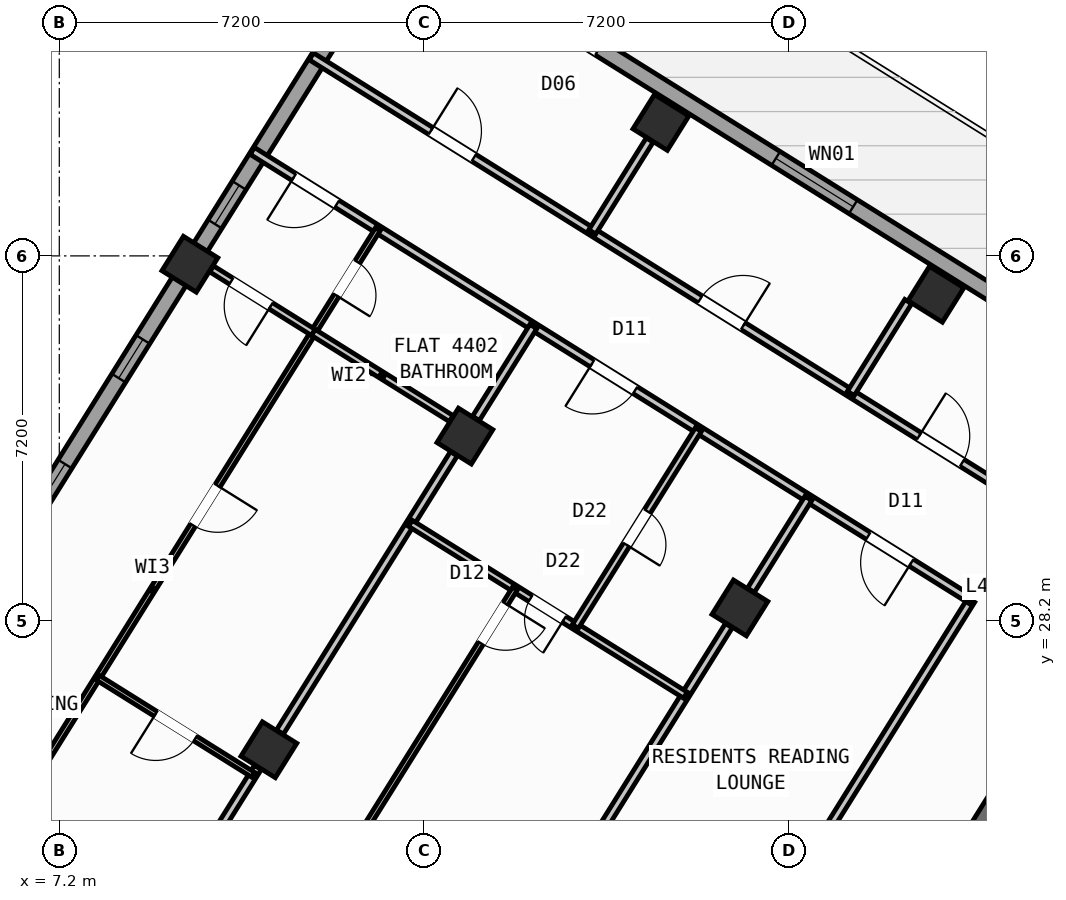
"""IFC4 building model, lengths in metres.
Left out: names, types, materials, properties, quantities, classifications, styles, units other than length and angle.
Written with IfcOpenShell. Run it as: python <this file> out.ifc"""

import sys

from ifc_helpers import new_model, si_unit, direction, frame, frame_2d, origin, origin_2d, place, context, subcontext, project, spatial, rectangle, hollow_rectangle, extrude, source, transform, mapped, element, fill, save


model = new_model("IFC4")
c1 = context("Model", 3, precision=1e-05, world=origin(), true_north=direction((0.0, 1.0)))
c2 = subcontext(c1, "Body", "Model", "MODEL_VIEW")
j1 = project(units=[si_unit("LENGTHUNIT", "METRE"), si_unit("PLANEANGLEUNIT", "RADIAN")], contexts=[c1])
p1 = place(None, origin())
s1 = spatial("IfcSite", under=j1, at=p1, CompositionType="ELEMENT")
p2 = place(p1, origin())
s2 = spatial("IfcBuilding", under=s1, at=p2, CompositionType="ELEMENT")
p3 = place(p2, frame((0.0, 0.0, 174.9)))
s3 = spatial("IfcBuildingStorey", under=s2, at=p3, CompositionType="ELEMENT", Elevation=174.9)
p4 = place(p3, frame((26.007, 24.976, 0.0), z_axis=(0.0, 0.0, 1.0), x_axis=(-0.529923795287, -0.848045264823, 0.0)))
e1 = element("IfcWall", 1, at=p4, inside=s3, PredefinedType="SHEAR", context=c2, shape_type="SweptSolid", body=[
    extrude(rectangle(XDim=6.425, YDim=0.55, at=frame_2d((3.212, 0.0))), origin(), (0.0, 0.0, 1.0), 4.22),
])
m1 = source(origin(), c2, "Body", "SweptSolid", [
    extrude(hollow_rectangle(XDim=0.8, YDim=0.8, WallThickness=0.032, at=origin_2d()), origin(), (0.0, 0.0, 1.0), 4.5),
])
for number, where, z_axis, x_axis in (
    (2, (24.5, 34.643, 0.0), (0.0, 0.0, 1.0), (-0.848, 0.53, 0.0)),
    (3, (20.632, 28.452, 0.0), (0.0, 0.0, 1.0), (-0.848, 0.53, 0.0)),
    (4, (19.073, 38.034, 0.0), (0.0, 0.0, 1.0), (-0.848, 0.53, 0.0)),
    (5, (15.205, 31.844, 0.0), (0.0, 0.0, 1.0), (-0.848, 0.53, 0.0)),
    (6, (11.336, 25.653, 0.0), (0.0, 0.0, 1.0), (-0.848, 0.53, 0.0)),
    (7, (9.777, 35.235, 0.0), (0.0, 0.0, 1.0), (-0.848, 0.53, 0.0)),
):
    element("IfcColumn", number, at=place(p3, frame(where, z_axis=z_axis, x_axis=x_axis)), inside=s3, PredefinedType="COLUMN", context=c2, shape_type="MappedRepresentation", body=[
        mapped(m1, transform((0.0, 0.0, 0.0), scale=1.0)),
    ])
p5 = place(p3, frame((2.415, 23.452, 0.0), z_axis=(0.0, 0.0, 1.0), x_axis=(0.52991049553, 0.848053575387, 0.0)))
e8 = element("IfcWall", 8, at=p5, inside=s3, PredefinedType="STANDARD", context=c2, shape_type="SweptSolid", body=[
    extrude(rectangle(XDim=21.587, YDim=0.32, at=frame_2d((10.794, 0.0))), origin(), (0.0, 0.0, 1.0), 2.395),
])
p6 = place(p5, frame((3.469, 0.0, 1.0)))
e9 = element("IfcOpeningElement", 9, at=p6, cuts=e8, PredefinedType="OPENING", context=c2, shape_type="SweptSolid", body=[
    extrude(rectangle(XDim=0.9, YDim=1.25, at=frame_2d((0.45, 0.625))), frame((0.0, 0.17, 0.0), z_axis=(0.0, -1.0, 0.0), x_axis=(1.0, 0.0, 0.0)), (0.0, 0.0, 1.0), 0.34),
])
p7 = place(p5, frame((8.344, 0.0, 1.0)))
e10 = element("IfcOpeningElement", 10, at=p7, cuts=e8, PredefinedType="OPENING", context=c2, shape_type="SweptSolid", body=[
    extrude(rectangle(XDim=0.9, YDim=1.25, at=frame_2d((0.45, 0.625))), frame((0.0, 0.17, 0.0), z_axis=(0.0, -1.0, 0.0), x_axis=(1.0, 0.0, 0.0)), (0.0, 0.0, 1.0), 0.34),
])
p8 = place(p5, frame((11.244, 0.0, 1.0)))
e11 = element("IfcOpeningElement", 11, at=p8, cuts=e8, PredefinedType="OPENING", context=c2, shape_type="SweptSolid", body=[
    extrude(rectangle(XDim=0.9, YDim=1.25, at=frame_2d((0.45, 0.625))), frame((0.0, 0.17, 0.0), z_axis=(0.0, -1.0, 0.0), x_axis=(1.0, 0.0, 0.0)), (0.0, 0.0, 1.0), 0.34),
])
p9 = place(p5, frame((14.829, 0.0, 1.0)))
e12 = element("IfcOpeningElement", 12, at=p9, cuts=e8, PredefinedType="OPENING", context=c2, shape_type="SweptSolid", body=[
    extrude(rectangle(XDim=0.9, YDim=1.25, at=frame_2d((0.45, 0.625))), frame((0.0, 0.17, 0.0), z_axis=(0.0, -1.0, 0.0), x_axis=(1.0, 0.0, 0.0)), (0.0, 0.0, 1.0), 0.34),
])
p10 = place(p3, frame((14.138, 41.825, 0.0), z_axis=(0.0, 0.0, 1.0), x_axis=(0.848046498049, -0.529921821731, 0.0)))
e13 = element("IfcWall", 13, at=p10, inside=s3, PredefinedType="STANDARD", context=c2, shape_type="SweptSolid", body=[
    extrude(rectangle(XDim=31.588, YDim=0.32, at=frame_2d((15.794, 0.0))), origin(), (0.0, 0.0, 1.0), 4.22),
])
p11 = place(p10, frame((3.339, 0.0, 0.0)))
e14 = element("IfcOpeningElement", 14, at=p11, cuts=e13, PredefinedType="OPENING", context=c2, shape_type="SweptSolid", body=[
    extrude(rectangle(XDim=1.05, YDim=2.15, at=frame_2d((0.525, 1.075))), frame((0.0, 0.17, 0.0), z_axis=(0.0, -1.0, 0.0), x_axis=(1.0, 0.0, 0.0)), (0.0, 0.0, 1.0), 0.34),
])
p12 = place(p10, frame((1.819, 0.0, 1.0)))
e15 = element("IfcOpeningElement", 15, at=p12, cuts=e13, PredefinedType="OPENING", context=c2, shape_type="SweptSolid", body=[
    extrude(rectangle(XDim=0.9, YDim=1.25, at=frame_2d((0.45, 0.625))), frame((0.0, 0.17, 0.0), z_axis=(0.0, -1.0, 0.0), x_axis=(1.0, 0.0, 0.0)), (0.0, 0.0, 1.0), 0.34),
])
p13 = place(p10, frame((8.494, 0.0, 0.85)))
e16 = element("IfcOpeningElement", 16, at=p13, cuts=e13, PredefinedType="OPENING", context=c2, shape_type="SweptSolid", body=[
    extrude(rectangle(XDim=1.8, YDim=1.5, at=frame_2d((0.9, 0.75))), frame((0.0, 0.17, 0.0), z_axis=(0.0, -1.0, 0.0), x_axis=(1.0, 0.0, 0.0)), (0.0, 0.0, 1.0), 0.34),
])
p14 = place(p10, frame((14.636, 0.0, 1.0)))
e17 = element("IfcOpeningElement", 17, at=p14, cuts=e13, PredefinedType="OPENING", context=c2, shape_type="SweptSolid", body=[
    extrude(rectangle(XDim=0.9, YDim=1.25, at=frame_2d((0.45, 0.625))), frame((0.0, 0.17, 0.0), z_axis=(0.0, -1.0, 0.0), x_axis=(1.0, 0.0, 0.0)), (0.0, 0.0, 1.0), 0.34),
])
p15 = place(p10, frame((22.456, 0.0, 0.95)))
e18 = element("IfcOpeningElement", 18, at=p15, cuts=e13, PredefinedType="OPENING", context=c2, shape_type="SweptSolid", body=[
    extrude(rectangle(XDim=1.2, YDim=1.4, at=frame_2d((0.6, 0.7))), frame((0.0, 0.17, 0.0), z_axis=(0.0, -1.0, 0.0), x_axis=(1.0, 0.0, 0.0)), (0.0, 0.0, 1.0), 0.34),
])
p16 = place(p10, frame((27.131, 0.0, 0.95)))
e19 = element("IfcOpeningElement", 19, at=p16, cuts=e13, PredefinedType="OPENING", context=c2, shape_type="SweptSolid", body=[
    extrude(rectangle(XDim=1.2, YDim=1.4, at=frame_2d((0.6, 0.7))), frame((0.0, 0.17, 0.0), z_axis=(0.0, -1.0, 0.0), x_axis=(1.0, 0.0, 0.0)), (0.0, 0.0, 1.0), 0.34),
])
p17 = place(p3, frame((25.198, 28.606, 0.0), z_axis=(0.0, 0.0, 1.0), x_axis=(-0.529921796515, -0.848046513806, 0.0)))
e20 = element("IfcWall", 20, at=p17, inside=s3, PredefinedType="PARTITIONING", context=c2, shape_type="SweptSolid", body=[
    extrude(rectangle(XDim=16.5, YDim=0.16, at=frame_2d((8.25, 0.0))), origin(), (0.0, 0.0, 1.0), 4.21),
])
p18 = place(p3, frame((26.363, 30.472, 0.0), z_axis=(0.0, 0.0, 1.0), x_axis=(-0.848052408131, 0.529912363569, 0.0)))
e21 = element("IfcWall", 21, at=p18, inside=s3, PredefinedType="PARTITIONING", context=c2, shape_type="SweptSolid", body=[
    extrude(rectangle(XDim=16.73, YDim=0.16, at=frame_2d((8.365, 0.0))), origin(), (0.0, 0.0, 1.0), 4.21),
])
p19 = place(p18, frame((1.588, 0.0, 0.0)))
e22 = element("IfcOpeningElement", 22, at=p19, cuts=e21, PredefinedType="OPENING", context=c2, shape_type="SweptSolid", body=[
    extrude(rectangle(XDim=1.0, YDim=2.1, at=frame_2d((0.5, 1.05))), frame((0.0, 0.09, 0.0), z_axis=(0.0, -1.0, 0.0), x_axis=(1.0, 0.0, 0.0)), (0.0, 0.0, 1.0), 0.18),
])
p20 = place(p18, frame((6.685, 0.0, 0.0)))
e23 = element("IfcOpeningElement", 23, at=p20, cuts=e21, PredefinedType="OPENING", context=c2, shape_type="SweptSolid", body=[
    extrude(rectangle(XDim=1.0, YDim=2.1, at=frame_2d((0.5, 1.05))), frame((0.0, 0.09, 0.0), z_axis=(0.0, -1.0, 0.0), x_axis=(1.0, 0.0, 0.0)), (0.0, 0.0, 1.0), 0.18),
])
p21 = place(p18, frame((12.951, 0.0, 0.0)))
e24 = element("IfcOpeningElement", 24, at=p21, cuts=e21, PredefinedType="OPENING", context=c2, shape_type="SweptSolid", body=[
    extrude(rectangle(XDim=1.0, YDim=2.1, at=frame_2d((0.5, 1.05))), frame((0.0, 0.09, 0.0), z_axis=(0.0, -1.0, 0.0), x_axis=(1.0, 0.0, 0.0)), (0.0, 0.0, 1.0), 0.18),
])
p22 = place(p3, frame((25.198, 28.606, 0.0), z_axis=(0.0, 0.0, 1.0), x_axis=(-0.848052408131, 0.529912363569, 0.0)))
e25 = element("IfcWall", 25, at=p22, inside=s3, PredefinedType="PARTITIONING", context=c2, shape_type="SweptSolid", body=[
    extrude(rectangle(XDim=16.73, YDim=0.16, at=frame_2d((8.365, 0.0))), origin(), (0.0, 0.0, 1.0), 4.21),
])
p23 = place(p22, frame((1.395, 0.0, 0.0)))
e26 = element("IfcOpeningElement", 26, at=p23, cuts=e25, PredefinedType="OPENING", context=c2, shape_type="SweptSolid", body=[
    extrude(rectangle(XDim=1.0, YDim=2.1, at=frame_2d((0.5, 1.05))), frame((0.0, 0.09, 0.0), z_axis=(0.0, -1.0, 0.0), x_axis=(1.0, 0.0, 0.0)), (0.0, 0.0, 1.0), 0.18),
])
p24 = place(p22, frame((7.82, 0.0, 0.0)))
e27 = element("IfcOpeningElement", 27, at=p24, cuts=e25, PredefinedType="OPENING", context=c2, shape_type="SweptSolid", body=[
    extrude(rectangle(XDim=1.0, YDim=2.1, at=frame_2d((0.5, 1.05))), frame((0.0, 0.09, 0.0), z_axis=(0.0, -1.0, 0.0), x_axis=(1.0, 0.0, 0.0)), (0.0, 0.0, 1.0), 0.18),
])
p25 = place(p22, frame((14.76, 0.0, 0.0)))
e28 = element("IfcOpeningElement", 28, at=p25, cuts=e25, PredefinedType="OPENING", context=c2, shape_type="SweptSolid", body=[
    extrude(rectangle(XDim=1.0, YDim=2.1, at=frame_2d((0.5, 1.05))), frame((0.0, 0.09, 0.0), z_axis=(0.0, -1.0, 0.0), x_axis=(1.0, 0.0, 0.0)), (0.0, 0.0, 1.0), 0.18),
])
p26 = place(p3, frame((21.983, 30.615, 0.0), z_axis=(0.0, 0.0, 1.0), x_axis=(-0.529978410432, -0.848011134641, 0.0)))
e29 = element("IfcWall", 29, at=p26, inside=s3, PredefinedType="PARTITIONING", context=c2, shape_type="SweptSolid", body=[
    extrude(rectangle(XDim=2.138, YDim=0.16, at=frame_2d((1.069, 0.0))), origin(), (0.0, 0.0, 1.0), 2.395),
])
p27 = place(p3, frame((20.414, 28.103, 0.0), z_axis=(0.0, 0.0, 1.0), x_axis=(-0.529934553702, -0.848038542045, 0.0)))
e30 = element("IfcWall", 30, at=p27, inside=s3, PredefinedType="PARTITIONING", context=c2, shape_type="SweptSolid", body=[
    extrude(rectangle(XDim=6.476, YDim=0.16, at=frame_2d((3.238, 0.0))), origin(), (0.0, 0.0, 1.0), 2.395),
])
p28 = place(p3, frame((16.556, 34.006, 0.0), z_axis=(0.0, 0.0, 1.0), x_axis=(-0.529927092104, -0.84804320471, 0.0)))
e31 = element("IfcWall", 31, at=p28, inside=s3, PredefinedType="PARTITIONING", context=c2, shape_type="SweptSolid", body=[
    extrude(rectangle(XDim=2.138, YDim=0.16, at=frame_2d((1.069, 0.0))), origin(), (0.0, 0.0, 1.0), 2.395),
])
p29 = place(p3, frame((14.986, 31.494, 0.0), z_axis=(0.0, 0.0, 1.0), x_axis=(-0.529907440938, -0.848055484057, 0.0)))
e32 = element("IfcWall", 32, at=p29, inside=s3, PredefinedType="PARTITIONING", context=c2, shape_type="SweptSolid", body=[
    extrude(rectangle(XDim=6.476, YDim=0.16, at=frame_2d((3.238, 0.0))), origin(), (0.0, 0.0, 1.0), 2.395),
])
p30 = place(p3, frame((11.118, 25.303, 0.0), z_axis=(0.0, 0.0, 1.0), x_axis=(-0.529919150083, -0.848048167486, 0.0)))
e33 = element("IfcWall", 33, at=p30, inside=s3, PredefinedType="PARTITIONING", context=c2, shape_type="SweptSolid", body=[
    extrude(rectangle(XDim=5.501, YDim=0.16, at=frame_2d((2.75, 0.0))), origin(), (0.0, 0.0, 1.0), 4.21),
])
p31 = place(p3, frame((19.556, 26.73, 0.0), z_axis=(0.0, 0.0, 1.0), x_axis=(-0.848049732085, 0.529916646191, 0.0)))
e34 = element("IfcWall", 34, at=p31, inside=s3, PredefinedType="PLUMBINGWALL", context=c2, shape_type="SweptSolid", body=[
    extrude(rectangle(XDim=6.4, YDim=0.14, at=frame_2d((3.2, 0.0))), origin(), (0.0, 0.0, 1.0), 4.21),
])
p32 = place(p31, frame((2.824, 0.0, 0.0)))
e35 = element("IfcOpeningElement", 35, at=p32, cuts=e34, PredefinedType="OPENING", context=c2, shape_type="SweptSolid", body=[
    extrude(rectangle(XDim=0.78, YDim=2.05, at=frame_2d((0.39, 1.025))), frame((0.0, 0.08, 0.0), z_axis=(0.0, -1.0, 0.0), x_axis=(1.0, 0.0, 0.0)), (0.0, 0.0, 1.0), 0.16),
])
p33 = place(p3, frame((19.812, 31.971, 0.0), z_axis=(0.0, 0.0, 1.0), x_axis=(-0.529917480809, -0.848049210561, 0.0)))
e36 = element("IfcWall", 36, at=p33, inside=s3, PredefinedType="PLUMBINGWALL", context=c2, shape_type="SweptSolid", body=[
    extrude(rectangle(XDim=4.58, YDim=0.14, at=frame_2d((2.29, 0.0))), origin(), (0.0, 0.0, 1.0), 4.21),
])
p34 = place(p33, frame((1.9, 0.0, 0.0)))
e37 = element("IfcOpeningElement", 37, at=p34, cuts=e36, PredefinedType="OPENING", context=c2, shape_type="SweptSolid", body=[
    extrude(rectangle(XDim=0.78, YDim=2.05, at=frame_2d((0.39, 1.025))), frame((0.0, 0.08, 0.0), z_axis=(0.0, -1.0, 0.0), x_axis=(1.0, 0.0, 0.0)), (0.0, 0.0, 1.0), 0.16),
])
p35 = place(p3, frame((16.191, 28.833, 0.0), z_axis=(0.0, 0.0, 1.0), x_axis=(-0.529921526101, -0.84804668278, 0.0)))
e38 = element("IfcWall", 38, at=p35, inside=s3, PredefinedType="PARTITIONING", context=c2, shape_type="SweptSolid", body=[
    extrude(rectangle(XDim=12.19, YDim=0.11, at=frame_2d((6.095, 0.0))), origin(), (0.0, 0.0, 1.0), 4.21),
])
p36 = place(p35, frame((0.35, 0.0, 0.0)))
e39 = element("IfcOpeningElement", 39, at=p36, cuts=e38, PredefinedType="OPENING", context=c2, shape_type="SweptSolid", body=[
    extrude(rectangle(XDim=0.92, YDim=2.08, at=frame_2d((0.46, 1.04))), frame((0.0, 0.065, 0.0), z_axis=(0.0, -1.0, 0.0), x_axis=(1.0, 0.0, 0.0)), (0.0, 0.0, 1.0), 0.13),
])
p37 = place(p3, frame((13.486, 35.924, 0.0), z_axis=(0.0, 0.0, 1.0), x_axis=(-0.529920421309, -0.848047373134, 0.0)))
e40 = element("IfcWall", 40, at=p37, inside=s3, PredefinedType="PARTITIONING", context=c2, shape_type="SweptSolid", body=[
    extrude(rectangle(XDim=16.77, YDim=0.11, at=frame_2d((8.385, 0.0))), origin(), (0.0, 0.0, 1.0), 4.21),
])
p38 = place(p37, frame((0.76, 0.0, 0.0)))
e41 = element("IfcOpeningElement", 41, at=p38, cuts=e40, PredefinedType="OPENING", context=c2, shape_type="SweptSolid", body=[
    extrude(rectangle(XDim=0.78, YDim=2.05, at=frame_2d((0.39, 1.025))), frame((0.0, 0.065, 0.0), z_axis=(0.0, -1.0, 0.0), x_axis=(1.0, 0.0, 0.0)), (0.0, 0.0, 1.0), 0.13),
])
p39 = place(p37, frame((5.967, 0.0, 0.0)))
e42 = element("IfcOpeningElement", 42, at=p39, cuts=e40, PredefinedType="OPENING", context=c2, shape_type="SweptSolid", body=[
    extrude(rectangle(XDim=0.92, YDim=2.08, at=frame_2d((0.46, 1.04))), frame((0.0, 0.065, 0.0), z_axis=(0.0, -1.0, 0.0), x_axis=(1.0, 0.0, 0.0)), (0.0, 0.0, 1.0), 0.13),
])
p40 = place(p3, frame((12.214, 33.889, 0.0), z_axis=(0.0, 0.0, 1.0), x_axis=(-0.848056217259, 0.529906267531, 0.0)))
e43 = element("IfcWall", 43, at=p40, inside=s3, PredefinedType="PLUMBINGWALL", context=c2, shape_type="SweptSolid", body=[
    extrude(rectangle(XDim=2.368, YDim=0.14, at=frame_2d((1.184, 0.0))), origin(), (0.0, 0.0, 1.0), 3.695),
])
p41 = place(p40, frame((0.99, 0.0, 0.0)))
e44 = element("IfcOpeningElement", 44, at=p41, cuts=e43, PredefinedType="OPENING", context=c2, shape_type="SweptSolid", body=[
    extrude(rectangle(XDim=0.92, YDim=2.08, at=frame_2d((0.46, 1.04))), frame((0.0, 0.08, 0.0), z_axis=(0.0, -1.0, 0.0), x_axis=(1.0, 0.0, 0.0)), (0.0, 0.0, 1.0), 0.16),
])
p42 = place(p3, frame((14.935, 32.189, 0.0), z_axis=(0.0, 0.0, 1.0), x_axis=(-0.848045332252, 0.529923687379, 0.0)))
e45 = element("IfcWall", 45, at=p42, inside=s3, PredefinedType="PLUMBINGWALL", context=c2, shape_type="SweptSolid", body=[
    extrude(rectangle(XDim=3.208, YDim=0.14, at=frame_2d((1.604, 0.0))), origin(), (0.0, 0.0, 1.0), 3.695),
])
p43 = place(p3, frame((11.027, 25.158, 0.0), z_axis=(0.0, 0.0, 1.0), x_axis=(-0.848051346257, 0.52991406295, 0.0)))
e46 = element("IfcWall", 46, at=p43, inside=s3, PredefinedType="PARTITIONING", context=c2, shape_type="SweptSolid", body=[
    extrude(rectangle(XDim=3.62, YDim=0.11, at=frame_2d((1.81, 0.0))), origin(), (0.0, 0.0, 1.0), 4.21),
])
p44 = place(p43, frame((1.35, 0.0, 0.0)))
e47 = element("IfcOpeningElement", 47, at=p44, cuts=e46, PredefinedType="OPENING", context=c2, shape_type="SweptSolid", body=[
    extrude(rectangle(XDim=0.92, YDim=2.08, at=frame_2d((0.46, 1.04))), frame((0.0, 0.065, 0.0), z_axis=(0.0, -1.0, 0.0), x_axis=(1.0, 0.0, 0.0)), (0.0, 0.0, 1.0), 0.13),
])
p45 = place(p3, frame((23.954, 34.499, 0.0), z_axis=(0.0, 0.0, 1.0), x_axis=(-0.529844966244, -0.848094518167, 0.0)))
e48 = element("IfcWall", 48, at=p45, inside=s3, PredefinedType="PARTITIONING", context=c2, shape_type="SweptSolid", body=[
    extrude(rectangle(XDim=2.138, YDim=0.16, at=frame_2d((1.069, 0.0))), origin(), (0.0, 0.0, 1.0), 2.395),
])
p46 = place(p3, frame((18.852, 37.687, 0.0), z_axis=(0.0, 0.0, 1.0), x_axis=(-0.529927092104, -0.84804320471, 0.0)))
e49 = element("IfcWall", 49, at=p46, inside=s3, PredefinedType="PARTITIONING", context=c2, shape_type="SweptSolid", body=[
    extrude(rectangle(XDim=2.138, YDim=0.16, at=frame_2d((1.069, 0.0))), origin(), (0.0, 0.0, 1.0), 2.395),
])
m2 = source(origin(), c2, "Body", "SweptSolid", [
    extrude(rectangle(XDim=0.9, YDim=1.25, at=frame_2d((0.45, 0.625))), frame((0.0, 0.03, 0.0), z_axis=(0.0, -1.0, 0.0), x_axis=(1.0, 0.0, 0.0)), (0.0, 0.0, 1.0), 0.06),
])
p47 = place(p7, origin())
e50 = element("IfcWindow", 50, at=p47, inside=s3, PartitioningType="SINGLE_PANEL", PredefinedType="WINDOW", context=c2, shape_type="MappedRepresentation", body=[
    mapped(m2, transform((0.0, 0.0, 0.0), scale=1.0)),
])
fill(e10, e50)
p48 = place(p8, origin())
e51 = element("IfcWindow", 51, at=p48, inside=s3, PartitioningType="SINGLE_PANEL", PredefinedType="WINDOW", context=c2, shape_type="MappedRepresentation", body=[
    mapped(m2, transform((0.0, 0.0, 0.0), scale=1.0)),
])
fill(e11, e51)
p49 = place(p9, origin())
e52 = element("IfcWindow", 52, at=p49, inside=s3, PartitioningType="SINGLE_PANEL", PredefinedType="WINDOW", context=c2, shape_type="MappedRepresentation", body=[
    mapped(m2, transform((0.0, 0.0, 0.0), scale=1.0)),
])
fill(e12, e52)
m3 = source(origin(), c2, "Body", "SweptSolid", [
    extrude(rectangle(XDim=1.8, YDim=1.5, at=frame_2d((0.9, 0.75))), frame((0.0, 0.03, 0.0), z_axis=(0.0, -1.0, 0.0), x_axis=(1.0, 0.0, 0.0)), (0.0, 0.0, 1.0), 0.06),
])
p50 = place(p13, origin())
e53 = element("IfcWindow", 53, at=p50, inside=s3, PartitioningType="SINGLE_PANEL", PredefinedType="WINDOW", context=c2, shape_type="MappedRepresentation", body=[
    mapped(m3, transform((0.0, 0.0, 0.0), scale=1.0)),
])
fill(e16, e53)
m4 = source(origin(), c2, "Body", "SweptSolid", [
    extrude(rectangle(XDim=1.0, YDim=2.1, at=frame_2d((0.5, 1.05))), frame((0.0, 0.025, 0.0), z_axis=(0.0, -1.0, 0.0), x_axis=(1.0, 0.0, 0.0)), (0.0, 0.0, 1.0), 0.05),
])
p51 = place(p23, origin())
e54 = element("IfcDoor", 54, at=p51, inside=s3, OperationType="SINGLE_SWING_LEFT", PredefinedType="DOOR", context=c2, shape_type="MappedRepresentation", body=[
    mapped(m4, transform((0.0, 0.0, 0.0), scale=1.0)),
])
fill(e26, e54)
m5 = source(origin(), c2, "Body", "SweptSolid", [
    extrude(rectangle(XDim=0.92, YDim=2.08, at=frame_2d((0.46, 1.04))), frame((0.0, 0.025, 0.0), z_axis=(0.0, -1.0, 0.0), x_axis=(1.0, 0.0, 0.0)), (0.0, 0.0, 1.0), 0.05),
])
p52 = place(p36, origin())
e55 = element("IfcDoor", 55, at=p52, inside=s3, OperationType="SINGLE_SWING_LEFT", PredefinedType="DOOR", context=c2, shape_type="MappedRepresentation", body=[
    mapped(m5, transform((0.0, 0.0, 0.0), scale=1.0)),
])
fill(e39, e55)
p53 = place(p24, origin())
e56 = element("IfcDoor", 56, at=p53, inside=s3, OperationType="SINGLE_SWING_RIGHT", PredefinedType="DOOR", context=c2, shape_type="MappedRepresentation", body=[
    mapped(m4, transform((0.0, 0.0, 0.0), scale=1.0)),
])
fill(e27, e56)
m6 = source(origin(), c2, "Body", "SweptSolid", [
    extrude(rectangle(XDim=0.78, YDim=2.05, at=frame_2d((0.39, 1.025))), frame((0.0, 0.025, 0.0), z_axis=(0.0, -1.0, 0.0), x_axis=(1.0, 0.0, 0.0)), (0.0, 0.0, 1.0), 0.05),
])
p54 = place(p32, origin())
e57 = element("IfcDoor", 57, at=p54, inside=s3, OperationType="SINGLE_SWING_LEFT", PredefinedType="DOOR", context=c2, shape_type="MappedRepresentation", body=[
    mapped(m6, transform((0.0, 0.0, 0.0), scale=1.0)),
])
fill(e35, e57)
p55 = place(p34, origin())
e58 = element("IfcDoor", 58, at=p55, inside=s3, OperationType="SINGLE_SWING_RIGHT", PredefinedType="DOOR", context=c2, shape_type="MappedRepresentation", body=[
    mapped(m6, transform((0.0, 0.0, 0.0), scale=1.0)),
])
fill(e37, e58)
p56 = place(p25, origin())
e59 = element("IfcDoor", 59, at=p56, inside=s3, OperationType="SINGLE_SWING_RIGHT", PredefinedType="DOOR", context=c2, shape_type="MappedRepresentation", body=[
    mapped(m4, transform((0.0, 0.0, 0.0), scale=1.0)),
])
fill(e28, e59)
p57 = place(p41, origin())
e60 = element("IfcDoor", 60, at=p57, inside=s3, OperationType="SINGLE_SWING_LEFT", PredefinedType="DOOR", context=c2, shape_type="MappedRepresentation", body=[
    mapped(m5, transform((0.0, 0.0, 0.0), scale=1.0)),
])
fill(e44, e60)
p58 = place(p38, origin())
e61 = element("IfcDoor", 61, at=p58, inside=s3, OperationType="SINGLE_SWING_RIGHT", PredefinedType="DOOR", context=c2, shape_type="MappedRepresentation", body=[
    mapped(m6, transform((0.0, 0.0, 0.0), scale=1.0)),
])
fill(e41, e61)
p59 = place(p39, origin())
e62 = element("IfcDoor", 62, at=p59, inside=s3, OperationType="SINGLE_SWING_LEFT", PredefinedType="DOOR", context=c2, shape_type="MappedRepresentation", body=[
    mapped(m5, transform((0.0, 0.0, 0.0), scale=1.0)),
])
fill(e42, e62)
p60 = place(p44, origin())
e63 = element("IfcDoor", 63, at=p60, inside=s3, OperationType="SINGLE_SWING_RIGHT", PredefinedType="DOOR", context=c2, shape_type="MappedRepresentation", body=[
    mapped(m5, transform((0.0, 0.0, 0.0), scale=1.0)),
])
fill(e47, e63)
p61 = place(p19, frame((1.0, 0.0, 0.0), z_axis=(0.0, 0.0, 1.0), x_axis=(-1.0, 0.0, 0.0)))
e64 = element("IfcDoor", 64, at=p61, inside=s3, OperationType="SINGLE_SWING_LEFT", PredefinedType="DOOR", context=c2, shape_type="MappedRepresentation", body=[
    mapped(m4, transform((0.0, 0.0, 0.0), scale=1.0)),
])
fill(e22, e64)
p62 = place(p20, frame((1.0, 0.0, 0.0), z_axis=(0.0, 0.0, 1.0), x_axis=(-1.0, 0.0, 0.0)))
e65 = element("IfcDoor", 65, at=p62, inside=s3, OperationType="SINGLE_SWING_RIGHT", PredefinedType="DOOR", context=c2, shape_type="MappedRepresentation", body=[
    mapped(m4, transform((0.0, 0.0, 0.0), scale=1.0)),
])
fill(e23, e65)
p63 = place(p21, frame((1.0, 0.0, 0.0), z_axis=(0.0, 0.0, 1.0), x_axis=(-1.0, 0.0, 0.0)))
e66 = element("IfcDoor", 66, at=p63, inside=s3, OperationType="SINGLE_SWING_LEFT", PredefinedType="DOOR", context=c2, shape_type="MappedRepresentation", body=[
    mapped(m4, transform((0.0, 0.0, 0.0), scale=1.0)),
])
fill(e24, e66)
save(model, sys.argv[1])
